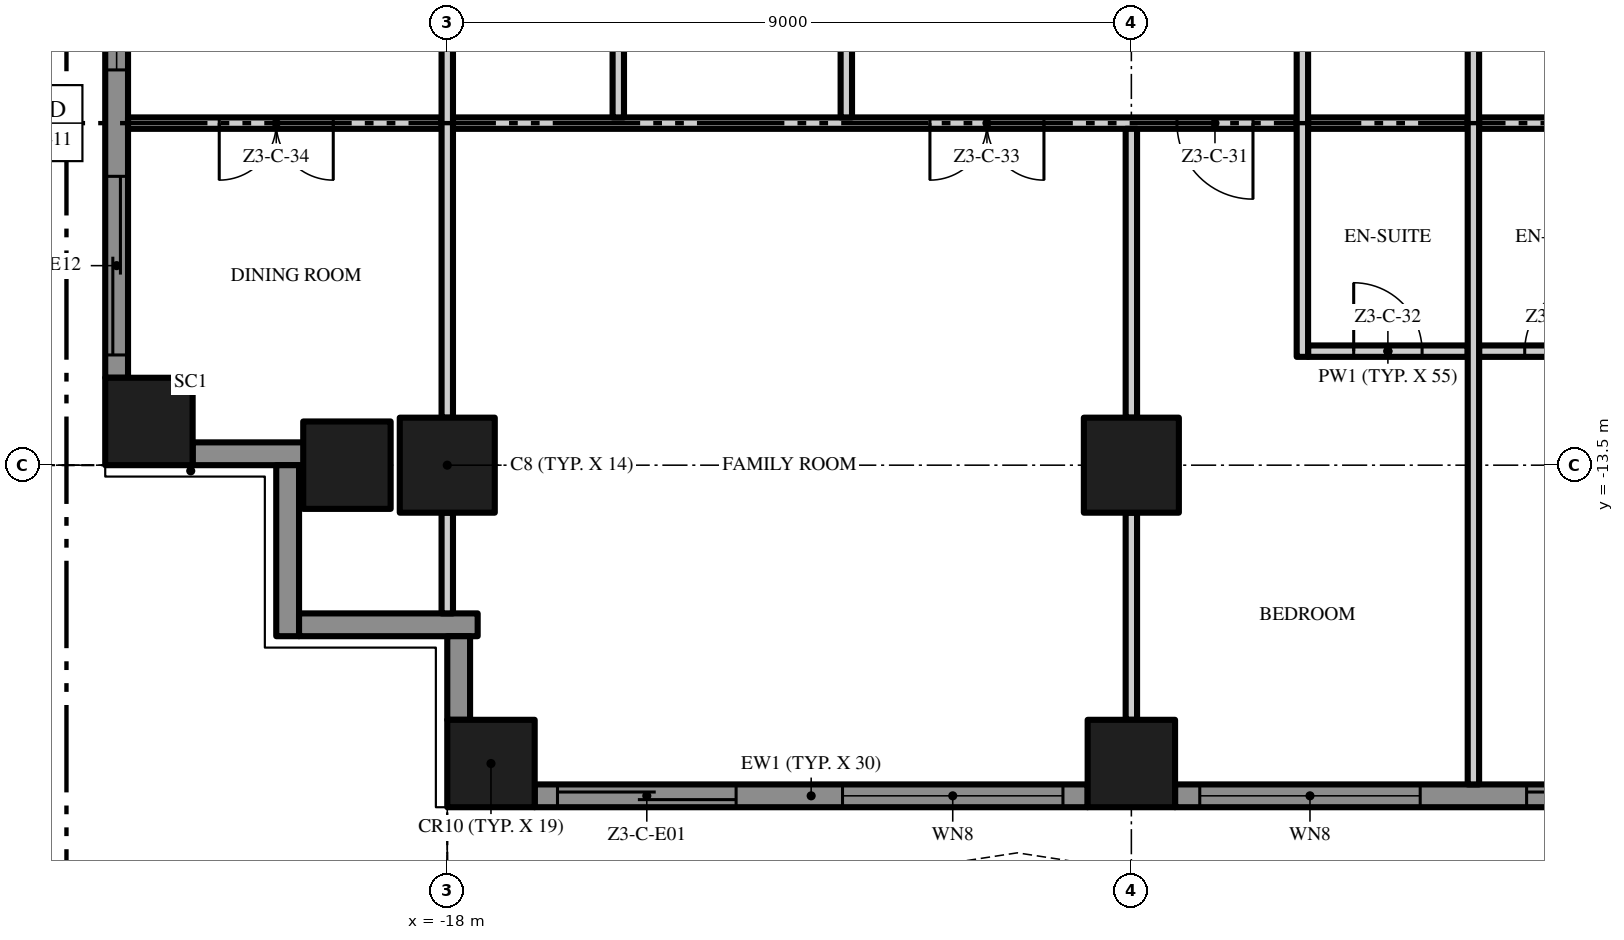
"""IFC4 building model, lengths in metres.
Left out: names, types, materials, properties, quantities, classifications, styles, units other than length and angle.
Written with IfcOpenShell. Run it as: python <this file> out.ifc"""

import sys

from ifc_helpers import new_model, si_unit, direction, frame, frame_2d, origin, origin_2d, place, context, subcontext, project, spatial, polyline, rectangle, outline, extrude, element, fill, save


model = new_model("IFC4")
c1 = context("Model", 3, precision=1e-05, world=origin(), true_north=direction((0.0, 1.0)))
c2 = subcontext(c1, "Body", "Model", "MODEL_VIEW")
j1 = project(units=[si_unit("LENGTHUNIT", "METRE"), si_unit("PLANEANGLEUNIT", "RADIAN")], contexts=[c1])
p1 = place(None, origin())
s1 = spatial("IfcSite", under=j1, at=p1, CompositionType="ELEMENT")
p2 = place(p1, origin())
s2 = spatial("IfcBuilding", under=s1, at=p2, CompositionType="ELEMENT")
p3 = place(p2, frame((0.0, 0.0, 151.6)))
s3 = spatial("IfcBuildingStorey", under=s2, at=p3, CompositionType="ELEMENT", Elevation=151.6)
p4 = place(p3, frame((-18.0, -13.5, 0.0), z_axis=(0.0, 0.0, 1.0), x_axis=(1.0, 0.0, 0.0)))
e1 = element("IfcColumn", 1, at=p4, inside=s3, PredefinedType="COLUMN", context=c2, shape_type="SweptSolid", body=[
    extrude(rectangle(XDim=1.25, YDim=1.25, at=origin_2d()), origin(), (0.0, 0.0, 1.0), 3.5),
])
for number, where, z_axis, x_axis in (
    (2, (-17.425, -17.425, 0.0), (0.0, 0.0, 1.0), (1.0, 0.0, 0.0)),
    (3, (-21.925, -12.925, 0.0), (0.0, 0.0, 1.0), (1.0, 0.0, 0.0)),
    (4, (-19.32, -13.5, 0.0), (0.0, 0.0, 1.0), (1.0, 0.0, 0.0)),
):
    element("IfcColumn", number, at=place(p3, frame(where, z_axis=z_axis, x_axis=x_axis)), inside=s3, PredefinedType="COLUMN", context=c2, shape_type="SweptSolid", body=[
        extrude(rectangle(XDim=1.15, YDim=1.15, at=origin_2d()), origin(), (0.0, 0.0, 1.0), 3.5),
    ])
p5 = place(p3, frame((-9.0, -13.5, 0.0), z_axis=(0.0, 0.0, 1.0), x_axis=(1.0, 0.0, 0.0)))
e5 = element("IfcColumn", 5, at=p5, inside=s3, PredefinedType="COLUMN", context=c2, shape_type="SweptSolid", body=[
    extrude(rectangle(XDim=1.25, YDim=1.25, at=origin_2d()), origin(), (0.0, 0.0, 1.0), 3.5),
])
p6 = place(p3, frame((-9.0, -17.425, 0.0), z_axis=(0.0, 0.0, 1.0), x_axis=(1.0, 0.0, 0.0)))
e6 = element("IfcColumn", 6, at=p6, inside=s3, PredefinedType="COLUMN", context=c2, shape_type="SweptSolid", body=[
    extrude(rectangle(XDim=1.15, YDim=1.15, at=origin_2d()), origin(), (0.0, 0.0, 1.0), 3.5),
])
p7 = place(p3, frame((-9.575, -17.85, 0.0), z_axis=(0.0, 0.0, 1.0), x_axis=(-1.0, 0.0, 0.0)))
e7 = element("IfcWall", 7, at=p7, inside=s3, PredefinedType="SOLIDWALL", context=c2, shape_type="SweptSolid", body=[
    extrude(rectangle(XDim=7.275, YDim=0.3, at=frame_2d((3.638, 0.0))), origin(), (0.0, 0.0, 1.0), 3.5),
])
p8 = place(p7, frame((4.625, 0.0, 0.0)))
e8 = element("IfcOpeningElement", 8, at=p8, cuts=e7, PredefinedType="OPENING", context=c2, shape_type="SweptSolid", body=[
    extrude(rectangle(XDim=2.35, YDim=2.4, at=frame_2d((1.175, 1.2))), frame((0.0, 0.16, 0.0), z_axis=(0.0, -1.0, 0.0), x_axis=(1.0, 0.0, 0.0)), (0.0, 0.0, 1.0), 0.32),
])
p9 = place(p7, frame((0.325, 0.0, 0.45)))
e9 = element("IfcOpeningElement", 9, at=p9, cuts=e7, PredefinedType="OPENING", context=c2, shape_type="SweptSolid", body=[
    extrude(rectangle(XDim=2.9, YDim=2.65, at=frame_2d((1.45, 1.325))), frame((0.0, 0.16, 0.0), z_axis=(0.0, -1.0, 0.0), x_axis=(1.0, 0.0, 0.0)), (0.0, 0.0, 1.0), 0.32),
])
p10 = place(p3, frame((-0.575, -17.85, 0.0), z_axis=(0.0, 0.0, 1.0), x_axis=(-1.0, 0.0, 0.0)))
e10 = element("IfcWall", 10, at=p10, inside=s3, PredefinedType="SOLIDWALL", context=c2, shape_type="SweptSolid", body=[
    extrude(rectangle(XDim=7.85, YDim=0.3, at=frame_2d((3.925, 0.0))), origin(), (0.0, 0.0, 1.0), 3.5),
])
p11 = place(p10, frame((4.625, 0.0, 0.45)))
e11 = element("IfcOpeningElement", 11, at=p11, cuts=e10, PredefinedType="OPENING", context=c2, shape_type="SweptSolid", body=[
    extrude(rectangle(XDim=2.9, YDim=2.65, at=frame_2d((1.45, 1.325))), frame((0.0, 0.16, 0.0), z_axis=(0.0, -1.0, 0.0), x_axis=(1.0, 0.0, 0.0)), (0.0, 0.0, 1.0), 0.32),
])
p12 = place(p10, frame((0.325, 0.0, 0.0)))
e12 = element("IfcOpeningElement", 12, at=p12, cuts=e10, PredefinedType="OPENING", context=c2, shape_type="SweptSolid", body=[
    extrude(rectangle(XDim=2.9, YDim=2.4, at=frame_2d((1.45, 1.2))), frame((0.0, 0.16, 0.0), z_axis=(0.0, -1.0, 0.0), x_axis=(1.0, 0.0, 0.0)), (0.0, 0.0, 1.0), 0.32),
])
p13 = place(p3, frame((-22.35, -12.35, 0.0), z_axis=(0.0, 0.0, 1.0), x_axis=(0.0, 1.0, 0.0)))
e13 = element("IfcWall", 13, at=p13, inside=s3, PredefinedType="SOLIDWALL", context=c2, shape_type="SweptSolid", body=[
    extrude(rectangle(XDim=7.275, YDim=0.3, at=frame_2d((3.638, 0.0))), origin(), (0.0, 0.0, 1.0), 3.5),
])
p14 = place(p13, frame((4.05, 0.0, 0.45)))
e14 = element("IfcOpeningElement", 14, at=p14, cuts=e13, PredefinedType="OPENING", context=c2, shape_type="SweptSolid", body=[
    extrude(rectangle(XDim=2.9, YDim=2.65, at=frame_2d((1.45, 1.325))), frame((0.0, 0.16, 0.0), z_axis=(0.0, -1.0, 0.0), x_axis=(1.0, 0.0, 0.0)), (0.0, 0.0, 1.0), 0.32),
])
p15 = place(p13, frame((0.3, 0.0, 0.0)))
e15 = element("IfcOpeningElement", 15, at=p15, cuts=e13, PredefinedType="OPENING", context=c2, shape_type="SweptSolid", body=[
    extrude(rectangle(XDim=2.35, YDim=2.4, at=frame_2d((1.175, 1.2))), frame((0.0, 0.16, 0.0), z_axis=(0.0, -1.0, 0.0), x_axis=(1.0, 0.0, 0.0)), (0.0, 0.0, 1.0), 0.32),
])
p16 = place(p3, frame((-19.85, -13.35, 0.0), z_axis=(0.0, 0.0, 1.0), x_axis=(-1.0, 0.0, 0.0)))
e16 = element("IfcWall", 16, at=p16, inside=s3, PredefinedType="SOLIDWALL", context=c2, shape_type="SweptSolid", body=[
    extrude(rectangle(XDim=1.5, YDim=0.3, at=frame_2d((0.75, 0.0))), origin(), (0.0, 0.0, 1.0), 3.5),
])
p17 = place(p3, frame((-20.1, -15.75, 0.0), z_axis=(0.0, 0.0, 1.0), x_axis=(0.0, 1.0, 0.0)))
e17 = element("IfcWall", 17, at=p17, inside=s3, PredefinedType="SOLIDWALL", context=c2, shape_type="SweptSolid", body=[
    extrude(rectangle(XDim=2.25, YDim=0.3, at=frame_2d((1.125, 0.0))), origin(), (0.0, 0.0, 1.0), 3.5),
])
p18 = place(p3, frame((-17.6, -15.6, 0.0), z_axis=(0.0, 0.0, 1.0), x_axis=(-1.0, 0.0, 0.0)))
e18 = element("IfcWall", 18, at=p18, inside=s3, PredefinedType="SOLIDWALL", context=c2, shape_type="SweptSolid", body=[
    extrude(rectangle(XDim=2.35, YDim=0.3, at=frame_2d((1.175, 0.0))), origin(), (0.0, 0.0, 1.0), 3.5),
])
p19 = place(p3, frame((-17.85, -16.85, 0.0), z_axis=(0.0, 0.0, 1.0), x_axis=(0.0, 1.0, 0.0)))
e19 = element("IfcWall", 19, at=p19, inside=s3, PredefinedType="SOLIDWALL", context=c2, shape_type="SweptSolid", body=[
    extrude(rectangle(XDim=1.1, YDim=0.3, at=frame_2d((0.55, 0.0))), origin(), (0.0, 0.0, 1.0), 3.5),
])
p20 = place(p3, origin())
e20 = element("IfcWall", 20, at=p20, inside=s3, PredefinedType="USERDEFINED", context=c2, shape_type="SweptSolid", body=[
    extrude(outline(polyline([(-18.0, -21.0), (-16.5, -20.771), (-15.0, -20.171), (-13.5, -19.429), (-12.0, -18.829), (-10.5, -18.6), (-9.0, -18.829), (-7.5, -19.429), (-6.0, -20.171), (-4.5, -20.771), (-3.0, -21.0), (-1.5, -20.771), (0.0, -20.171), (1.5, -19.429), (3.0, -18.829), (4.5, -18.6), (6.0, -18.829), (7.5, -19.429), (9.0, -20.171), (10.5, -20.771), (12.0, -21.0), (13.5, -20.771), (15.0, -20.171), (16.5, -19.429), (18.0, -18.829), (17.907, -18.597), (16.398, -19.201), (14.898, -19.942), (13.434, -20.528), (12.0, -20.747), (10.566, -20.528), (9.102, -19.942), (7.602, -19.201), (6.066, -18.586), (4.5, -18.347), (2.934, -18.586), (1.398, -19.201), (-0.102, -19.942), (-1.566, -20.528), (-3.0, -20.747), (-4.434, -20.528), (-5.898, -19.942), (-7.398, -19.201), (-8.934, -18.586), (-10.5, -18.347), (-12.066, -18.586), (-13.602, -19.201), (-15.102, -19.942), (-16.566, -20.528), (-18.038, -20.753), (-18.0, -21.0)])), origin(), (0.0, 0.0, 1.0), 0.9),
])
p21 = place(p3, origin())
e21 = element("IfcWall", 21, at=p21, inside=s3, PredefinedType="USERDEFINED", context=c2, shape_type="SweptSolid", body=[
    extrude(outline(polyline([(-25.5, 18.0), (-25.271, 16.5), (-24.671, 15.0), (-23.929, 13.5), (-23.329, 12.0), (-23.1, 10.5), (-23.329, 9.0), (-23.929, 7.5), (-24.671, 6.0), (-25.271, 4.5), (-25.5, 3.0), (-25.271, 1.5), (-24.671, 0.0), (-23.929, -1.5), (-23.329, -3.0), (-23.1, -4.5), (-23.329, -6.0), (-23.929, -7.5), (-24.671, -9.0), (-25.271, -10.5), (-25.5, -12.0), (-25.271, -13.5), (-25.024, -13.462), (-25.247, -12.0), (-25.028, -10.566), (-24.442, -9.102), (-23.701, -7.602), (-23.086, -6.066), (-22.847, -4.5), (-23.086, -2.934), (-23.701, -1.398), (-24.442, 0.102), (-25.028, 1.566), (-25.247, 3.0), (-25.028, 4.434), (-24.442, 5.898), (-23.701, 7.398), (-23.086, 8.934), (-22.847, 10.5), (-23.086, 12.066), (-23.701, 13.602), (-24.442, 15.102), (-25.028, 16.566), (-25.253, 18.038), (-25.5, 18.0)])), origin(), (0.0, 0.0, 1.0), 0.9),
])
p22 = place(p3, frame((-6.675, -12.0, 0.0), z_axis=(0.0, 0.0, 1.0), x_axis=(1.0, 0.0, 0.0)))
e22 = element("IfcWall", 22, at=p22, inside=s3, PredefinedType="PARTITIONING", context=c2, shape_type="SweptSolid", body=[
    extrude(rectangle(XDim=2.1, YDim=0.15, at=frame_2d((1.05, 0.0))), origin(), (0.0, 0.0, 1.0), 3.5),
])
p23 = place(p22, frame((0.6, 0.0, 0.0)))
e23 = element("IfcOpeningElement", 23, at=p23, cuts=e22, PredefinedType="OPENING", context=c2, shape_type="SweptSolid", body=[
    extrude(rectangle(XDim=0.9, YDim=2.1, at=frame_2d((0.45, 1.05))), frame((0.0, 0.085, 0.0), z_axis=(0.0, -1.0, 0.0), x_axis=(1.0, 0.0, 0.0)), (0.0, 0.0, 1.0), 0.17),
])
p24 = place(p3, frame((-4.425, -12.0, 0.0), z_axis=(0.0, 0.0, 1.0), x_axis=(1.0, 0.0, 0.0)))
e24 = element("IfcWall", 24, at=p24, inside=s3, PredefinedType="PARTITIONING", context=c2, shape_type="SweptSolid", body=[
    extrude(rectangle(XDim=2.1, YDim=0.15, at=frame_2d((1.05, 0.0))), origin(), (0.0, 0.0, 1.0), 3.5),
])
p25 = place(p24, frame((0.6, 0.0, 0.0)))
e25 = element("IfcOpeningElement", 25, at=p25, cuts=e24, PredefinedType="OPENING", context=c2, shape_type="SweptSolid", body=[
    extrude(rectangle(XDim=0.9, YDim=2.1, at=frame_2d((0.45, 1.05))), frame((0.0, 0.085, 0.0), z_axis=(0.0, -1.0, 0.0), x_axis=(1.0, 0.0, 0.0)), (0.0, 0.0, 1.0), 0.17),
])
p26 = place(p3, frame((-18.075, -9.0, 0.0), z_axis=(0.0, 0.0, 1.0), x_axis=(-1.0, 0.0, 0.0)))
e26 = element("IfcWall", 26, at=p26, inside=s3, PredefinedType="PARTITIONING", context=c2, shape_type="SweptSolid", body=[
    extrude(rectangle(XDim=4.125, YDim=0.15, at=frame_2d((2.062, 0.0))), origin(), (0.0, 0.0, 1.0), 3.5),
])
p27 = place(p26, frame((1.425, 0.0, 0.0)))
e27 = element("IfcOpeningElement", 27, at=p27, cuts=e26, PredefinedType="OPENING", context=c2, shape_type="SweptSolid", body=[
    extrude(rectangle(XDim=1.5, YDim=2.4, at=frame_2d((0.75, 1.2))), frame((0.0, 0.085, 0.0), z_axis=(0.0, -1.0, 0.0), x_axis=(1.0, 0.0, 0.0)), (0.0, 0.0, 1.0), 0.17),
])
p28 = place(p3, frame((-6.825, -9.0, 0.0), z_axis=(0.0, 0.0, 1.0), x_axis=(-1.0, 0.0, 0.0)))
e28 = element("IfcWall", 28, at=p28, inside=s3, PredefinedType="PARTITIONING", context=c2, shape_type="SweptSolid", body=[
    extrude(rectangle(XDim=11.1, YDim=0.15, at=frame_2d((5.55, 0.0))), origin(), (0.0, 0.0, 1.0), 3.5),
])
p29 = place(p28, frame((0.575, 0.0, 0.0)))
e29 = element("IfcOpeningElement", 29, at=p29, cuts=e28, PredefinedType="OPENING", context=c2, shape_type="SweptSolid", body=[
    extrude(rectangle(XDim=1.0, YDim=2.4, at=frame_2d((0.5, 1.2))), frame((0.0, 0.085, 0.0), z_axis=(0.0, -1.0, 0.0), x_axis=(1.0, 0.0, 0.0)), (0.0, 0.0, 1.0), 0.17),
])
p30 = place(p28, frame((3.325, 0.0, 0.0)))
e30 = element("IfcOpeningElement", 30, at=p30, cuts=e28, PredefinedType="OPENING", context=c2, shape_type="SweptSolid", body=[
    extrude(rectangle(XDim=1.5, YDim=2.4, at=frame_2d((0.75, 1.2))), frame((0.0, 0.085, 0.0), z_axis=(0.0, -1.0, 0.0), x_axis=(1.0, 0.0, 0.0)), (0.0, 0.0, 1.0), 0.17),
])
for number, where, z_axis, x_axis in (
    (31, (-6.675, -9.0, 0.0), (0.0, 0.0, 1.0), (1.0, 0.0, 0.0)),
    (32, (-4.425, -9.0, 0.0), (0.0, 0.0, 1.0), (1.0, 0.0, 0.0)),
):
    element("IfcWall", number, at=place(p3, frame(where, z_axis=z_axis, x_axis=x_axis)), inside=s3, PredefinedType="PARTITIONING", context=c2, shape_type="SweptSolid", body=[
        extrude(rectangle(XDim=2.1, YDim=0.15, at=frame_2d((1.05, 0.0))), origin(), (0.0, 0.0, 1.0), 3.5),
    ])
p31 = place(p3, frame((-18.0, -15.45, 0.0), z_axis=(0.0, 0.0, 1.0), x_axis=(0.0, 1.0, 0.0)))
e33 = element("IfcWall", 33, at=p31, inside=s3, PredefinedType="PARTITIONING", context=c2, shape_type="SweptSolid", body=[
    extrude(rectangle(XDim=1.325, YDim=0.15, at=frame_2d((0.662, 0.0))), origin(), (0.0, 0.0, 1.0), 3.5),
])
p32 = place(p3, frame((-18.0, -12.875, 0.0), z_axis=(0.0, 0.0, 1.0), x_axis=(0.0, 1.0, 0.0)))
e34 = element("IfcWall", 34, at=p32, inside=s3, PredefinedType="PARTITIONING", context=c2, shape_type="SweptSolid", body=[
    extrude(rectangle(XDim=7.75, YDim=0.15, at=frame_2d((3.875, 0.0))), origin(), (0.0, 0.0, 1.0), 3.5),
])
p33 = place(p3, frame((-15.75, -8.925, 0.0), z_axis=(0.0, 0.0, 1.0), x_axis=(0.0, 1.0, 0.0)))
e35 = element("IfcWall", 35, at=p33, inside=s3, PredefinedType="PARTITIONING", context=c2, shape_type="SweptSolid", body=[
    extrude(rectangle(XDim=4.35, YDim=0.15, at=frame_2d((2.175, 0.0))), origin(), (0.0, 0.0, 1.0), 3.5),
])
p34 = place(p3, frame((-12.75, -8.925, 0.0), z_axis=(0.0, 0.0, 1.0), x_axis=(0.0, 1.0, 0.0)))
e36 = element("IfcWall", 36, at=p34, inside=s3, PredefinedType="PARTITIONING", context=c2, shape_type="SweptSolid", body=[
    extrude(rectangle(XDim=4.5, YDim=0.15, at=frame_2d((2.25, 0.0))), origin(), (0.0, 0.0, 1.0), 3.5),
])
p35 = place(p3, frame((-9.0, -16.85, 0.0), z_axis=(0.0, 0.0, 1.0), x_axis=(0.0, 1.0, 0.0)))
e37 = element("IfcWall", 37, at=p35, inside=s3, PredefinedType="PARTITIONING", context=c2, shape_type="SweptSolid", body=[
    extrude(rectangle(XDim=2.725, YDim=0.15, at=frame_2d((1.363, 0.0))), origin(), (0.0, 0.0, 1.0), 3.5),
])
p36 = place(p3, frame((-9.0, -12.875, 0.0), z_axis=(0.0, 0.0, 1.0), x_axis=(0.0, 1.0, 0.0)))
e38 = element("IfcWall", 38, at=p36, inside=s3, PredefinedType="PARTITIONING", context=c2, shape_type="SweptSolid", body=[
    extrude(rectangle(XDim=3.8, YDim=0.15, at=frame_2d((1.9, 0.0))), origin(), (0.0, 0.0, 1.0), 3.5),
])
p37 = place(p3, frame((-6.75, -12.075, 0.0), z_axis=(0.0, 0.0, 1.0), x_axis=(0.0, 1.0, 0.0)))
e39 = element("IfcWall", 39, at=p37, inside=s3, PredefinedType="PARTITIONING", context=c2, shape_type="SweptSolid", body=[
    extrude(rectangle(XDim=7.65, YDim=0.15, at=frame_2d((3.825, 0.0))), origin(), (0.0, 0.0, 1.0), 3.5),
])
p38 = place(p3, frame((-4.5, -17.7, 0.0), z_axis=(0.0, 0.0, 1.0), x_axis=(0.0, 1.0, 0.0)))
e40 = element("IfcWall", 40, at=p38, inside=s3, PredefinedType="PARTITIONING", context=c2, shape_type="SweptSolid", body=[
    extrude(rectangle(XDim=13.125, YDim=0.15, at=frame_2d((6.562, 0.0))), origin(), (0.0, 0.0, 1.0), 3.5),
])
p39 = place(p8, origin())
e41 = element("IfcDoor", 41, at=p39, inside=s3, OperationType="SINGLE_SWING_LEFT", PredefinedType="DOOR", context=c2, shape_type="SweptSolid", body=[
    extrude(rectangle(XDim=2.35, YDim=2.4, at=frame_2d((1.175, 1.2))), frame((0.0, 0.025, 0.0), z_axis=(0.0, -1.0, 0.0), x_axis=(1.0, 0.0, 0.0)), (0.0, 0.0, 1.0), 0.05),
])
fill(e8, e41)
p40 = place(p9, origin())
e42 = element("IfcWindow", 42, at=p40, inside=s3, PartitioningType="SINGLE_PANEL", PredefinedType="WINDOW", context=c2, shape_type="SweptSolid", body=[
    extrude(rectangle(XDim=2.9, YDim=2.65, at=frame_2d((1.45, 1.325))), frame((0.0, 0.03, 0.0), z_axis=(0.0, -1.0, 0.0), x_axis=(1.0, 0.0, 0.0)), (0.0, 0.0, 1.0), 0.06),
])
fill(e9, e42)
p41 = place(p11, origin())
e43 = element("IfcWindow", 43, at=p41, inside=s3, PartitioningType="SINGLE_PANEL", PredefinedType="WINDOW", context=c2, shape_type="SweptSolid", body=[
    extrude(rectangle(XDim=2.9, YDim=2.65, at=frame_2d((1.45, 1.325))), frame((0.0, 0.03, 0.0), z_axis=(0.0, -1.0, 0.0), x_axis=(1.0, 0.0, 0.0)), (0.0, 0.0, 1.0), 0.06),
])
fill(e11, e43)
p42 = place(p12, origin())
e44 = element("IfcDoor", 44, at=p42, inside=s3, OperationType="SINGLE_SWING_LEFT", PredefinedType="DOOR", context=c2, shape_type="SweptSolid", body=[
    extrude(rectangle(XDim=2.9, YDim=2.4, at=frame_2d((1.45, 1.2))), frame((0.0, 0.025, 0.0), z_axis=(0.0, -1.0, 0.0), x_axis=(1.0, 0.0, 0.0)), (0.0, 0.0, 1.0), 0.05),
])
fill(e12, e44)
p43 = place(p14, origin())
e45 = element("IfcWindow", 45, at=p43, inside=s3, PartitioningType="SINGLE_PANEL", PredefinedType="WINDOW", context=c2, shape_type="SweptSolid", body=[
    extrude(rectangle(XDim=2.9, YDim=2.65, at=frame_2d((1.45, 1.325))), frame((0.0, 0.03, 0.0), z_axis=(0.0, -1.0, 0.0), x_axis=(1.0, 0.0, 0.0)), (0.0, 0.0, 1.0), 0.06),
])
fill(e14, e45)
p44 = place(p15, origin())
e46 = element("IfcDoor", 46, at=p44, inside=s3, OperationType="SINGLE_SWING_LEFT", PredefinedType="DOOR", context=c2, shape_type="SweptSolid", body=[
    extrude(rectangle(XDim=2.35, YDim=2.4, at=frame_2d((1.175, 1.2))), frame((0.0, 0.025, 0.0), z_axis=(0.0, -1.0, 0.0), x_axis=(1.0, 0.0, 0.0)), (0.0, 0.0, 1.0), 0.05),
])
fill(e15, e46)
p45 = place(p25, origin())
e47 = element("IfcDoor", 47, at=p45, inside=s3, OperationType="SINGLE_SWING_RIGHT", PredefinedType="DOOR", context=c2, shape_type="SweptSolid", body=[
    extrude(rectangle(XDim=0.9, YDim=2.1, at=frame_2d((0.45, 1.05))), frame((0.0, 0.025, 0.0), z_axis=(0.0, -1.0, 0.0), x_axis=(1.0, 0.0, 0.0)), (0.0, 0.0, 1.0), 0.05),
])
fill(e25, e47)
p46 = place(p29, origin())
e48 = element("IfcDoor", 48, at=p46, inside=s3, OperationType="SINGLE_SWING_LEFT", PredefinedType="DOOR", context=c2, shape_type="SweptSolid", body=[
    extrude(rectangle(XDim=1.0, YDim=2.4, at=frame_2d((0.5, 1.2))), frame((0.0, 0.025, 0.0), z_axis=(0.0, -1.0, 0.0), x_axis=(1.0, 0.0, 0.0)), (0.0, 0.0, 1.0), 0.05),
])
fill(e29, e48)
p47 = place(p23, origin())
e49 = element("IfcDoor", 49, at=p47, inside=s3, OperationType="SINGLE_SWING_LEFT", PredefinedType="DOOR", context=c2, shape_type="SweptSolid", body=[
    extrude(rectangle(XDim=0.9, YDim=2.1, at=frame_2d((0.45, 1.05))), frame((0.0, 0.025, 0.0), z_axis=(0.0, -1.0, 0.0), x_axis=(1.0, 0.0, 0.0)), (0.0, 0.0, 1.0), 0.05),
])
fill(e23, e49)
p48 = place(p30, origin())
e50 = element("IfcDoor", 50, at=p48, inside=s3, OperationType="DOUBLE_DOOR_SINGLE_SWING", PredefinedType="DOOR", context=c2, shape_type="SweptSolid", body=[
    extrude(rectangle(XDim=1.5, YDim=2.4, at=frame_2d((0.75, 1.2))), frame((0.0, 0.025, 0.0), z_axis=(0.0, -1.0, 0.0), x_axis=(1.0, 0.0, 0.0)), (0.0, 0.0, 1.0), 0.05),
])
fill(e30, e50)
p49 = place(p27, origin())
e51 = element("IfcDoor", 51, at=p49, inside=s3, OperationType="DOUBLE_DOOR_SINGLE_SWING", PredefinedType="DOOR", context=c2, shape_type="SweptSolid", body=[
    extrude(rectangle(XDim=1.5, YDim=2.4, at=frame_2d((0.75, 1.2))), frame((0.0, 0.025, 0.0), z_axis=(0.0, -1.0, 0.0), x_axis=(1.0, 0.0, 0.0)), (0.0, 0.0, 1.0), 0.05),
])
fill(e27, e51)
save(model, sys.argv[1])
